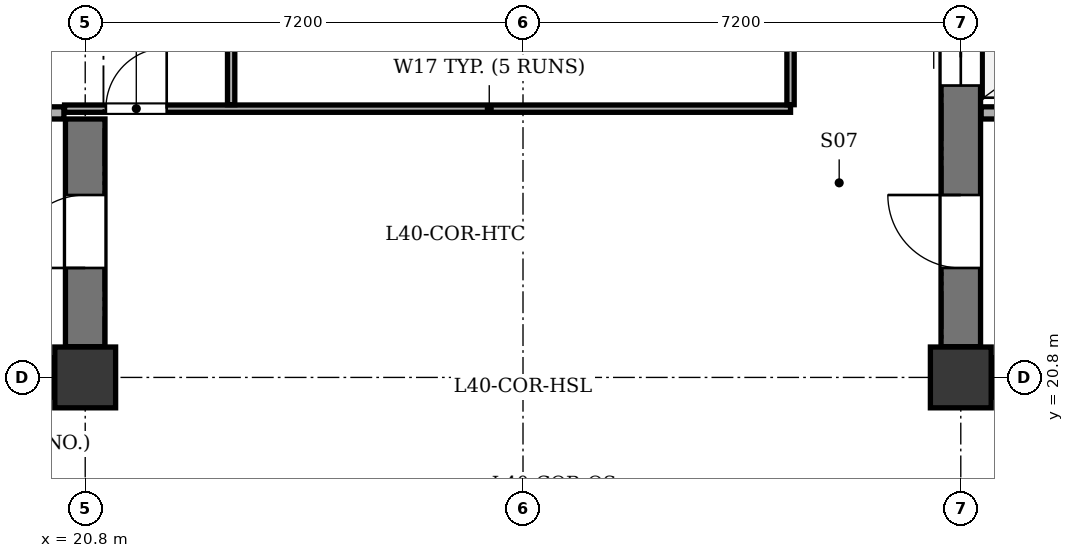
"""IFC4 building model, lengths in metres.
Left out: names, types, materials, properties, quantities, classifications, styles, units other than length and angle.
Written with IfcOpenShell. Run it as: python <this file> out.ifc"""

import sys

from ifc_helpers import new_model, si_unit, direction, frame, frame_2d, origin, origin_2d, place, context, subcontext, project, spatial, rectangle, extrude, element, fill, save


model = new_model("IFC4")
c1 = context("Model", 3, precision=1e-05, world=origin(), true_north=direction((0.0, 1.0)))
c2 = subcontext(c1, "Body", "Model", "MODEL_VIEW")
j1 = project(units=[si_unit("LENGTHUNIT", "METRE"), si_unit("PLANEANGLEUNIT", "RADIAN")], contexts=[c1])
p1 = place(None, origin())
s1 = spatial("IfcSite", under=j1, at=p1, CompositionType="ELEMENT")
p2 = place(p1, origin())
s2 = spatial("IfcBuilding", under=s1, at=p2, CompositionType="ELEMENT")
p3 = place(p2, frame((0.0, 0.0, 158.8)))
s3 = spatial("IfcBuildingStorey", under=s2, at=p3, CompositionType="ELEMENT", Elevation=158.8)
for number, where, z_axis, x_axis in (
    (1, (20.8, 20.8, 0.0), (0.0, 0.0, 1.0), (1.0, 0.0, 0.0)),
    (2, (35.2, 20.8, 0.0), (0.0, 0.0, 1.0), (1.0, 0.0, 0.0)),
):
    element("IfcColumn", number, at=place(p3, frame(where, z_axis=z_axis, x_axis=x_axis)), inside=s3, PredefinedType="COLUMN", context=c2, shape_type="SweptSolid", body=[
        extrude(rectangle(XDim=1.0, YDim=1.0, at=origin_2d()), origin(), (0.0, 0.0, 1.0), 3.5),
    ])
p4 = place(p3, frame((13.305, 20.8, 0.0), z_axis=(0.0, 0.0, 1.0), x_axis=(1.0, 0.0, 0.0)))
e3 = element("IfcWall", 3, at=p4, inside=s3, PredefinedType="SHEAR", context=c2, shape_type="SweptSolid", body=[
    extrude(rectangle(XDim=6.99, YDim=0.65, at=frame_2d((3.495, 0.0))), origin(), (0.0, 0.0, 1.0), 3.05),
])
p5 = place(p3, frame((20.8, 21.305, 0.0), z_axis=(0.0, 0.0, 1.0), x_axis=(0.0, 1.0, 0.0)))
e4 = element("IfcWall", 4, at=p5, inside=s3, PredefinedType="SHEAR", context=c2, shape_type="SweptSolid", body=[
    extrude(rectangle(XDim=3.745, YDim=0.65, at=frame_2d((1.873, 0.0))), origin(), (0.0, 0.0, 1.0), 3.05),
])
p6 = place(p5, frame((1.295, 0.0, 0.0)))
e5 = element("IfcOpeningElement", 5, at=p6, cuts=e4, PredefinedType="OPENING", context=c2, shape_type="SweptSolid", body=[
    extrude(rectangle(XDim=1.2, YDim=2.15, at=frame_2d((0.6, 1.075))), frame((0.0, 0.335, 0.0), z_axis=(0.0, -1.0, 0.0), x_axis=(1.0, 0.0, 0.0)), (0.0, 0.0, 1.0), 0.67),
])
p7 = place(p3, frame((16.6, 25.15, 0.0), z_axis=(0.0, 0.0, 1.0), x_axis=(1.0, 0.0, 0.0)))
e6 = element("IfcWall", 6, at=p7, inside=s3, PredefinedType="SOLIDWALL", context=c2, shape_type="SweptSolid", body=[
    extrude(rectangle(XDim=3.85, YDim=0.2, at=frame_2d((1.925, 0.0))), origin(), (0.0, 0.0, 1.0), 3.05),
])
p8 = place(p3, frame((35.705, 20.8, 0.0), z_axis=(0.0, 0.0, 1.0), x_axis=(1.0, 0.0, 0.0)))
e7 = element("IfcWall", 7, at=p8, inside=s3, PredefinedType="SHEAR", context=c2, shape_type="SweptSolid", body=[
    extrude(rectangle(XDim=6.99, YDim=0.65, at=frame_2d((3.495, 0.0))), origin(), (0.0, 0.0, 1.0), 3.05),
])
p9 = place(p3, frame((35.2, 21.305, 0.0), z_axis=(0.0, 0.0, 1.0), x_axis=(0.0, 1.0, 0.0)))
e8 = element("IfcWall", 8, at=p9, inside=s3, PredefinedType="SHEAR", context=c2, shape_type="SweptSolid", body=[
    extrude(rectangle(XDim=11.79, YDim=0.65, at=frame_2d((5.895, 0.0))), origin(), (0.0, 0.0, 1.0), 3.05),
])
p10 = place(p9, frame((1.295, 0.0, 0.0)))
e9 = element("IfcOpeningElement", 9, at=p10, cuts=e8, PredefinedType="OPENING", context=c2, shape_type="SweptSolid", body=[
    extrude(rectangle(XDim=1.2, YDim=2.15, at=frame_2d((0.6, 1.075))), frame((0.0, 0.335, 0.0), z_axis=(0.0, -1.0, 0.0), x_axis=(1.0, 0.0, 0.0)), (0.0, 0.0, 1.0), 0.67),
])
p11 = place(p9, frame((4.295, 0.0, 0.0)))
e10 = element("IfcOpeningElement", 10, at=p11, cuts=e8, PredefinedType="OPENING", context=c2, shape_type="SweptSolid", body=[
    extrude(rectangle(XDim=1.1, YDim=2.1, at=frame_2d((0.55, 1.05))), frame((0.0, 0.335, 0.0), z_axis=(0.0, -1.0, 0.0), x_axis=(1.0, 0.0, 0.0)), (0.0, 0.0, 1.0), 0.67),
])
p12 = place(p9, frame((6.245, 0.0, 0.0)))
e11 = element("IfcOpeningElement", 11, at=p12, cuts=e8, PredefinedType="OPENING", context=c2, shape_type="SweptSolid", body=[
    extrude(rectangle(XDim=1.1, YDim=2.1, at=frame_2d((0.55, 1.05))), frame((0.0, 0.335, 0.0), z_axis=(0.0, -1.0, 0.0), x_axis=(1.0, 0.0, 0.0)), (0.0, 0.0, 1.0), 0.67),
])
p13 = place(p9, frame((8.195, 0.0, 0.0)))
e12 = element("IfcOpeningElement", 12, at=p13, cuts=e8, PredefinedType="OPENING", context=c2, shape_type="SweptSolid", body=[
    extrude(rectangle(XDim=1.1, YDim=2.1, at=frame_2d((0.55, 1.05))), frame((0.0, 0.335, 0.0), z_axis=(0.0, -1.0, 0.0), x_axis=(1.0, 0.0, 0.0)), (0.0, 0.0, 1.0), 0.67),
])
p14 = place(p3, frame((35.535, 25.15, 0.0), z_axis=(0.0, 0.0, 1.0), x_axis=(1.0, 0.0, 0.0)))
e13 = element("IfcWall", 13, at=p14, inside=s3, PredefinedType="SOLIDWALL", context=c2, shape_type="SweptSolid", body=[
    extrude(rectangle(XDim=3.865, YDim=0.2, at=frame_2d((1.933, 0.0))), origin(), (0.0, 0.0, 1.0), 3.05),
])
p15 = place(p3, frame((20.46, 25.22, 0.0), z_axis=(0.0, 0.0, 1.0), x_axis=(1.0, 0.0, 0.0)))
e14 = element("IfcWall", 14, at=p15, inside=s3, PredefinedType="PARTITIONING", context=c2, shape_type="SweptSolid", body=[
    extrude(rectangle(XDim=11.94, YDim=0.12, at=frame_2d((5.97, 0.0))), origin(), (0.0, 0.0, 1.0), 3.05),
])
p16 = place(p15, frame((0.68, 0.0, 0.0)))
e15 = element("IfcOpeningElement", 15, at=p16, cuts=e14, PredefinedType="OPENING", context=c2, shape_type="SweptSolid", body=[
    extrude(rectangle(XDim=1.0, YDim=2.1, at=frame_2d((0.5, 1.05))), frame((0.0, 0.07, 0.0), z_axis=(0.0, -1.0, 0.0), x_axis=(1.0, 0.0, 0.0)), (0.0, 0.0, 1.0), 0.14),
])
p17 = place(p3, frame((32.4, 25.285, 0.0), z_axis=(0.0, 0.0, 1.0), x_axis=(0.0, 1.0, 0.0)))
e16 = element("IfcWall", 16, at=p17, inside=s3, PredefinedType="PARTITIONING", context=c2, shape_type="SweptSolid", body=[
    extrude(rectangle(XDim=5.67, YDim=0.12, at=frame_2d((2.835, 0.0))), origin(), (0.0, 0.0, 1.0), 3.05),
])
p18 = place(p17, frame((1.035, 0.0, 0.0)))
e17 = element("IfcOpeningElement", 17, at=p18, cuts=e16, PredefinedType="OPENING", context=c2, shape_type="SweptSolid", body=[
    extrude(rectangle(XDim=0.95, YDim=2.1, at=frame_2d((0.475, 1.05))), frame((0.0, 0.07, 0.0), z_axis=(0.0, -1.0, 0.0), x_axis=(1.0, 0.0, 0.0)), (0.0, 0.0, 1.0), 0.14),
])
p19 = place(p17, frame((3.835, 0.0, 0.0)))
e18 = element("IfcOpeningElement", 18, at=p19, cuts=e16, PredefinedType="OPENING", context=c2, shape_type="SweptSolid", body=[
    extrude(rectangle(XDim=0.95, YDim=2.1, at=frame_2d((0.475, 1.05))), frame((0.0, 0.07, 0.0), z_axis=(0.0, -1.0, 0.0), x_axis=(1.0, 0.0, 0.0)), (0.0, 0.0, 1.0), 0.14),
])
p20 = place(p3, frame((23.2, 25.285, 0.0), z_axis=(0.0, 0.0, 1.0), x_axis=(0.0, 1.0, 0.0)))
e19 = element("IfcWall", 19, at=p20, inside=s3, PredefinedType="PARTITIONING", context=c2, shape_type="SweptSolid", body=[
    extrude(rectangle(XDim=5.67, YDim=0.12, at=frame_2d((2.835, 0.0))), origin(), (0.0, 0.0, 1.0), 3.05),
])
p21 = place(p6, origin())
e20 = element("IfcDoor", 20, at=p21, inside=s3, OperationType="SINGLE_SWING_LEFT", PredefinedType="DOOR", context=c2, shape_type="SweptSolid", body=[
    extrude(rectangle(XDim=1.2, YDim=2.15, at=frame_2d((0.6, 1.075))), frame((0.0, 0.025, 0.0), z_axis=(0.0, -1.0, 0.0), x_axis=(1.0, 0.0, 0.0)), (0.0, 0.0, 1.0), 0.05),
])
fill(e5, e20)
p22 = place(p10, origin())
e21 = element("IfcDoor", 21, at=p22, inside=s3, OperationType="SINGLE_SWING_RIGHT", PredefinedType="DOOR", context=c2, shape_type="SweptSolid", body=[
    extrude(rectangle(XDim=1.2, YDim=2.15, at=frame_2d((0.6, 1.075))), frame((0.0, 0.025, 0.0), z_axis=(0.0, -1.0, 0.0), x_axis=(1.0, 0.0, 0.0)), (0.0, 0.0, 1.0), 0.05),
])
fill(e9, e21)
p23 = place(p11, origin())
e22 = element("IfcDoor", 22, at=p23, inside=s3, OperationType="DOUBLE_DOOR_SLIDING", PredefinedType="DOOR", context=c2, shape_type="SweptSolid", body=[
    extrude(rectangle(XDim=1.1, YDim=2.1, at=frame_2d((0.55, 1.05))), frame((0.0, 0.025, 0.0), z_axis=(0.0, -1.0, 0.0), x_axis=(1.0, 0.0, 0.0)), (0.0, 0.0, 1.0), 0.05),
])
fill(e10, e22)
p24 = place(p16, origin())
e23 = element("IfcDoor", 23, at=p24, inside=s3, OperationType="SINGLE_SWING_RIGHT", PredefinedType="DOOR", context=c2, shape_type="SweptSolid", body=[
    extrude(rectangle(XDim=1.0, YDim=2.1, at=frame_2d((0.5, 1.05))), frame((0.0, 0.025, 0.0), z_axis=(0.0, -1.0, 0.0), x_axis=(1.0, 0.0, 0.0)), (0.0, 0.0, 1.0), 0.05),
])
fill(e15, e23)
save(model, sys.argv[1])
